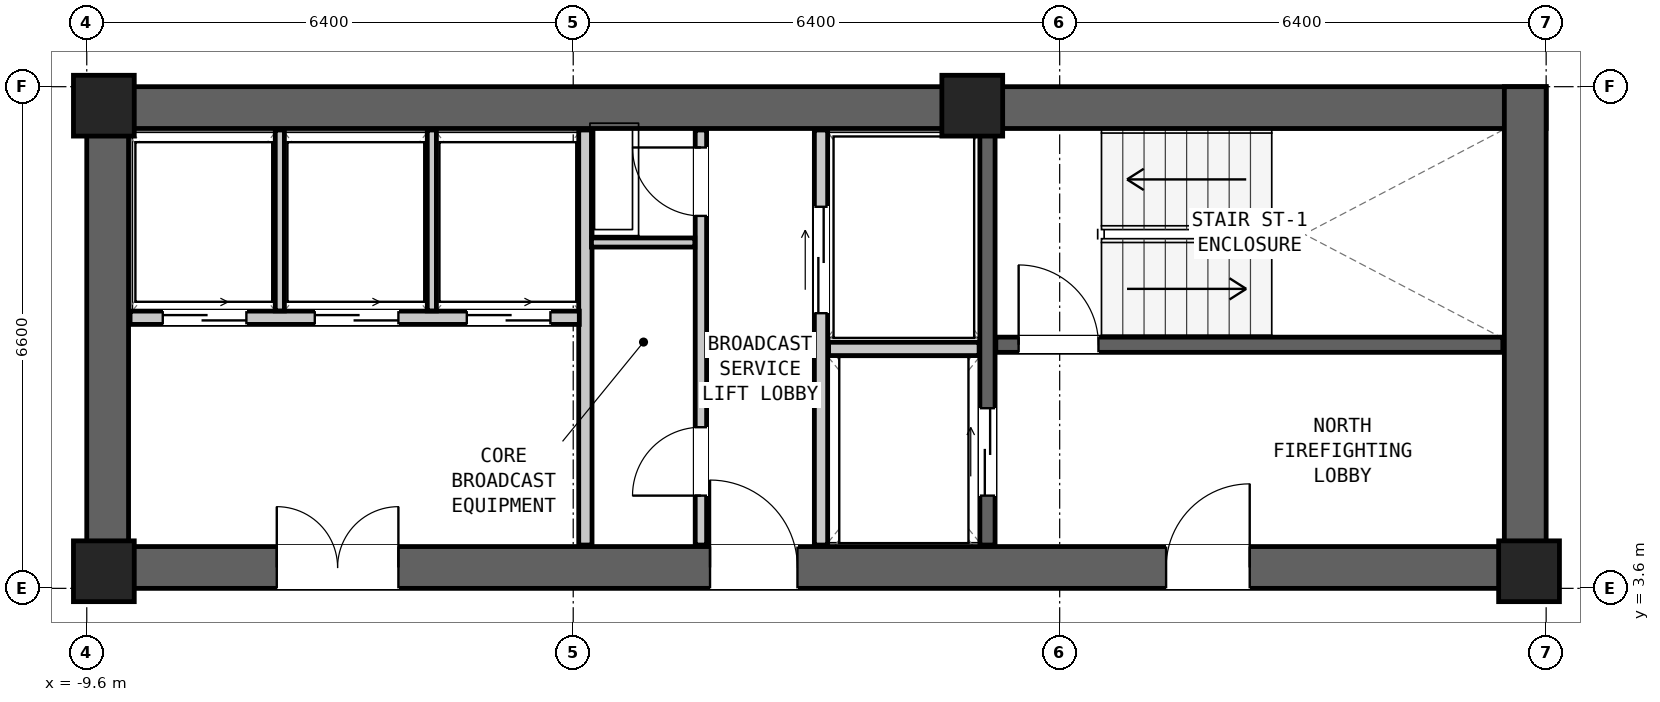
"""IFC4 building model, lengths in metres.
Left out: names, types, materials, properties, quantities, classifications, styles, units other than length and angle.
Written with IfcOpenShell. Run it as: python <this file> out.ifc"""

import sys

from ifc_helpers import new_model, si_unit, direction, frame, frame_2d, origin, origin_2d, place, context, subcontext, project, spatial, rectangle, extrude, element, fill, save


model = new_model("IFC4")
c1 = context("Model", 3, precision=1e-05, world=origin(), true_north=direction((0.0, 1.0)))
c2 = subcontext(c1, "Body", "Model", "MODEL_VIEW")
j1 = project(units=[si_unit("LENGTHUNIT", "METRE"), si_unit("PLANEANGLEUNIT", "RADIAN")], contexts=[c1])
p1 = place(None, origin())
s1 = spatial("IfcSite", under=j1, at=p1, CompositionType="ELEMENT")
p2 = place(p1, origin())
s2 = spatial("IfcBuilding", under=s1, at=p2, CompositionType="ELEMENT")
p3 = place(p2, frame((0.0, 0.0, 44.4)))
s3 = spatial("IfcBuildingStorey", under=s2, at=p3, CompositionType="ELEMENT", Elevation=44.4)
p4 = place(p3, frame((-9.6, 9.925, 0.0), z_axis=(0.0, 0.0, 1.0), x_axis=(1.0, 0.0, 0.0)))
e1 = element("IfcWall", 1, at=p4, inside=s3, PredefinedType="SHEAR", context=c2, shape_type="SweptSolid", body=[
    extrude(rectangle(XDim=19.2, YDim=0.55, at=frame_2d((9.6, 0.0))), origin(), (0.0, 0.0, 1.0), 3.05),
])
p5 = place(p3, frame((-9.6, 3.875, 0.0), z_axis=(0.0, 0.0, 1.0), x_axis=(1.0, 0.0, 0.0)))
e2 = element("IfcWall", 2, at=p5, inside=s3, PredefinedType="SHEAR", context=c2, shape_type="SweptSolid", body=[
    extrude(rectangle(XDim=19.2, YDim=0.55, at=frame_2d((9.6, 0.0))), origin(), (0.0, 0.0, 1.0), 3.05),
])
p6 = place(p5, frame((14.2, 0.0, 0.0)))
e3 = element("IfcOpeningElement", 3, at=p6, cuts=e2, PredefinedType="OPENING", context=c2, shape_type="SweptSolid", body=[
    extrude(rectangle(XDim=1.1, YDim=2.08, at=frame_2d((0.55, 1.04))), frame((0.0, 0.287, 0.0), z_axis=(0.0, -1.0, 0.0), x_axis=(1.0, 0.0, 0.0)), (0.0, 0.0, 1.0), 0.574),
])
p7 = place(p5, frame((8.2, 0.0, 0.0)))
e4 = element("IfcOpeningElement", 4, at=p7, cuts=e2, PredefinedType="OPENING", context=c2, shape_type="SweptSolid", body=[
    extrude(rectangle(XDim=1.15, YDim=2.1, at=frame_2d((0.575, 1.05))), frame((0.0, 0.287, 0.0), z_axis=(0.0, -1.0, 0.0), x_axis=(1.0, 0.0, 0.0)), (0.0, 0.0, 1.0), 0.574),
])
p8 = place(p5, frame((2.5, 0.0, 0.0)))
e5 = element("IfcOpeningElement", 5, at=p8, cuts=e2, PredefinedType="OPENING", context=c2, shape_type="SweptSolid", body=[
    extrude(rectangle(XDim=1.6, YDim=2.12, at=frame_2d((0.8, 1.06))), frame((0.0, 0.287, 0.0), z_axis=(0.0, -1.0, 0.0), x_axis=(1.0, 0.0, 0.0)), (0.0, 0.0, 1.0), 0.574),
])
for number, where, z_axis, x_axis in (
    (6, (-9.325, 3.6, 0.0), (0.0, 0.0, 1.0), (0.0, 1.0, 0.0)),
    (7, (9.325, 3.6, 0.0), (0.0, 0.0, 1.0), (0.0, 1.0, 0.0)),
):
    element("IfcWall", number, at=place(p3, frame(where, z_axis=z_axis, x_axis=x_axis)), inside=s3, PredefinedType="SHEAR", context=c2, shape_type="SweptSolid", body=[
        extrude(rectangle(XDim=6.6, YDim=0.55, at=frame_2d((3.3, 0.0))), origin(), (0.0, 0.0, 1.0), 3.05),
    ])
for number, where, z_axis, x_axis in (
    (8, (-9.375, 9.95, 0.0), (0.0, 0.0, 1.0), (1.0, 0.0, 0.0)),
    (9, (2.05, 9.95, 0.0), (0.0, 0.0, 1.0), (1.0, 0.0, 0.0)),
    (10, (-9.375, 3.825, 0.0), (0.0, 0.0, 1.0), (1.0, 0.0, 0.0)),
    (11, (9.375, 3.825, 0.0), (0.0, 0.0, 1.0), (1.0, 0.0, 0.0)),
):
    element("IfcColumn", number, at=place(p3, frame(where, z_axis=z_axis, x_axis=x_axis)), inside=s3, PredefinedType="COLUMN", context=c2, shape_type="SweptSolid", body=[
        extrude(rectangle(XDim=0.8, YDim=0.8, at=origin_2d()), origin(), (0.0, 0.0, 1.0), 3.05),
    ])
p9 = place(p3, frame((2.36, 6.805, 0.0), z_axis=(0.0, 0.0, 1.0), x_axis=(1.0, 0.0, 0.0)))
e12 = element("IfcWall", 12, at=p9, inside=s3, PredefinedType="SHEAR", context=c2, shape_type="SweptSolid", body=[
    extrude(rectangle(XDim=6.67, YDim=0.2, at=frame_2d((3.335, 0.0))), origin(), (0.0, 0.0, 1.0), 2.83),
])
p10 = place(p9, frame((0.3, 0.0, 0.0)))
e13 = element("IfcOpeningElement", 13, at=p10, cuts=e12, PredefinedType="OPENING", context=c2, shape_type="SweptSolid", body=[
    extrude(rectangle(XDim=1.05, YDim=2.08, at=frame_2d((0.525, 1.04))), frame((0.0, 0.112, 0.0), z_axis=(0.0, -1.0, 0.0), x_axis=(1.0, 0.0, 0.0)), (0.0, 0.0, 1.0), 0.224),
])
p11 = place(p3, frame((2.25, 4.17, 0.0), z_axis=(0.0, 0.0, 1.0), x_axis=(0.0, 1.0, 0.0)))
e14 = element("IfcWall", 14, at=p11, inside=s3, PredefinedType="SHEAR", context=c2, shape_type="SweptSolid", body=[
    extrude(rectangle(XDim=5.46, YDim=0.2, at=frame_2d((2.73, 0.0))), origin(), (0.0, 0.0, 1.0), 2.83),
])
p12 = place(p11, frame((0.65, 0.0, 0.0)))
e15 = element("IfcOpeningElement", 15, at=p12, cuts=e14, PredefinedType="OPENING", context=c2, shape_type="SweptSolid", body=[
    extrude(rectangle(XDim=1.15, YDim=2.08, at=frame_2d((0.575, 1.04))), frame((0.0, 0.112, 0.0), z_axis=(0.0, -1.0, 0.0), x_axis=(1.0, 0.0, 0.0)), (0.0, 0.0, 1.0), 0.224),
])
p13 = place(p3, frame((0.06, 4.17, 0.0), z_axis=(0.0, 0.0, 1.0), x_axis=(0.0, 1.0, 0.0)))
e16 = element("IfcWall", 16, at=p13, inside=s3, PredefinedType="PARTITIONING", context=c2, shape_type="SweptSolid", body=[
    extrude(rectangle(XDim=5.46, YDim=0.175, at=frame_2d((2.73, 0.0))), origin(), (0.0, 0.0, 1.0), 2.83),
])
p14 = place(p13, frame((3.05, 0.0, 0.0)))
e17 = element("IfcOpeningElement", 17, at=p14, cuts=e16, PredefinedType="OPENING", context=c2, shape_type="SweptSolid", body=[
    extrude(rectangle(XDim=1.4, YDim=2.12, at=frame_2d((0.7, 1.06))), frame((0.0, 0.1, 0.0), z_axis=(0.0, -1.0, 0.0), x_axis=(1.0, 0.0, 0.0)), (0.0, 0.0, 1.0), 0.199),
])
p15 = place(p3, frame((0.16, 6.75, 0.0), z_axis=(0.0, 0.0, 1.0), x_axis=(1.0, 0.0, 0.0)))
e18 = element("IfcWall", 18, at=p15, inside=s3, PredefinedType="PARTITIONING", context=c2, shape_type="SweptSolid", body=[
    extrude(rectangle(XDim=1.98, YDim=0.175, at=frame_2d((0.99, 0.0))), origin(), (0.0, 0.0, 1.0), 2.83),
])
p16 = place(p3, frame((-3.04, 4.17, 0.0), z_axis=(0.0, 0.0, 1.0), x_axis=(0.0, 1.0, 0.0)))
e19 = element("IfcWall", 19, at=p16, inside=s3, PredefinedType="PARTITIONING", context=c2, shape_type="SweptSolid", body=[
    extrude(rectangle(XDim=5.46, YDim=0.175, at=frame_2d((2.73, 0.0))), origin(), (0.0, 0.0, 1.0), 2.83),
])
p17 = place(p3, frame((-1.52, 4.17, 0.0), z_axis=(0.0, 0.0, 1.0), x_axis=(0.0, 1.0, 0.0)))
e20 = element("IfcWall", 20, at=p17, inside=s3, PredefinedType="PARTITIONING", context=c2, shape_type="SweptSolid", body=[
    extrude(rectangle(XDim=5.46, YDim=0.15, at=frame_2d((2.73, 0.0))), origin(), (0.0, 0.0, 1.0), 2.83),
])
p18 = place(p17, frame((4.33, 0.0, 0.0)))
e21 = element("IfcOpeningElement", 21, at=p18, cuts=e20, PredefinedType="OPENING", context=c2, shape_type="SweptSolid", body=[
    extrude(rectangle(XDim=0.9, YDim=2.05, at=frame_2d((0.45, 1.025))), frame((0.0, 0.087, 0.0), z_axis=(0.0, -1.0, 0.0), x_axis=(1.0, 0.0, 0.0)), (0.0, 0.0, 1.0), 0.174),
])
p19 = place(p17, frame((0.65, 0.0, 0.0)))
e22 = element("IfcOpeningElement", 22, at=p19, cuts=e20, PredefinedType="OPENING", context=c2, shape_type="SweptSolid", body=[
    extrude(rectangle(XDim=0.9, YDim=2.05, at=frame_2d((0.45, 1.025))), frame((0.0, 0.087, 0.0), z_axis=(0.0, -1.0, 0.0), x_axis=(1.0, 0.0, 0.0)), (0.0, 0.0, 1.0), 0.174),
])
p20 = place(p3, frame((-2.96, 8.15, 0.0), z_axis=(0.0, 0.0, 1.0), x_axis=(1.0, 0.0, 0.0)))
e23 = element("IfcWall", 23, at=p20, inside=s3, PredefinedType="PARTITIONING", context=c2, shape_type="SweptSolid", body=[
    extrude(rectangle(XDim=1.36, YDim=0.12, at=frame_2d((0.68, 0.0))), origin(), (0.0, 0.0, 1.0), 2.83),
])
p21 = place(p3, frame((-9.03, 7.16, 0.0), z_axis=(0.0, 0.0, 1.0), x_axis=(1.0, 0.0, 0.0)))
e24 = element("IfcWall", 24, at=p21, inside=s3, PredefinedType="PARTITIONING", context=c2, shape_type="SweptSolid", body=[
    extrude(rectangle(XDim=5.91, YDim=0.175, at=frame_2d((2.955, 0.0))), origin(), (0.0, 0.0, 1.0), 2.83),
])
p22 = place(p21, frame((0.43, 0.0, 0.0)))
e25 = element("IfcOpeningElement", 25, at=p22, cuts=e24, PredefinedType="OPENING", context=c2, shape_type="SweptSolid", body=[
    extrude(rectangle(XDim=1.1, YDim=2.06, at=frame_2d((0.55, 1.03))), frame((0.0, 0.1, 0.0), z_axis=(0.0, -1.0, 0.0), x_axis=(1.0, 0.0, 0.0)), (0.0, 0.0, 1.0), 0.199),
])
p23 = place(p21, frame((2.43, 0.0, 0.0)))
e26 = element("IfcOpeningElement", 26, at=p23, cuts=e24, PredefinedType="OPENING", context=c2, shape_type="SweptSolid", body=[
    extrude(rectangle(XDim=1.1, YDim=2.06, at=frame_2d((0.55, 1.03))), frame((0.0, 0.1, 0.0), z_axis=(0.0, -1.0, 0.0), x_axis=(1.0, 0.0, 0.0)), (0.0, 0.0, 1.0), 0.199),
])
p24 = place(p21, frame((4.43, 0.0, 0.0)))
e27 = element("IfcOpeningElement", 27, at=p24, cuts=e24, PredefinedType="OPENING", context=c2, shape_type="SweptSolid", body=[
    extrude(rectangle(XDim=1.1, YDim=2.06, at=frame_2d((0.55, 1.03))), frame((0.0, 0.1, 0.0), z_axis=(0.0, -1.0, 0.0), x_axis=(1.0, 0.0, 0.0)), (0.0, 0.0, 1.0), 0.199),
])
for number, where, z_axis, x_axis in (
    (28, (-7.06, 7.25, 0.0), (0.0, 0.0, 1.0), (0.0, 1.0, 0.0)),
    (29, (-5.06, 7.25, 0.0), (0.0, 0.0, 1.0), (0.0, 1.0, 0.0)),
):
    element("IfcWall", number, at=place(p3, frame(where, z_axis=z_axis, x_axis=x_axis)), inside=s3, PredefinedType="PARTITIONING", context=c2, shape_type="SweptSolid", body=[
        extrude(rectangle(XDim=2.38, YDim=0.12, at=frame_2d((1.19, 0.0))), origin(), (0.0, 0.0, 1.0), 2.83),
    ])
p25 = place(p10, origin())
e30 = element("IfcDoor", 30, at=p25, inside=s3, OperationType="SINGLE_SWING_LEFT", PredefinedType="DOOR", context=c2, shape_type="SweptSolid", body=[
    extrude(rectangle(XDim=1.05, YDim=2.08, at=frame_2d((0.525, 1.04))), frame((0.0, 0.025, 0.0), z_axis=(0.0, -1.0, 0.0), x_axis=(1.0, 0.0, 0.0)), (0.0, 0.0, 1.0), 0.05),
])
fill(e13, e30)
p26 = place(p6, origin())
e31 = element("IfcDoor", 31, at=p26, inside=s3, OperationType="SINGLE_SWING_RIGHT", PredefinedType="DOOR", context=c2, shape_type="SweptSolid", body=[
    extrude(rectangle(XDim=1.1, YDim=2.08, at=frame_2d((0.55, 1.04))), frame((0.0, 0.025, 0.0), z_axis=(0.0, -1.0, 0.0), x_axis=(1.0, 0.0, 0.0)), (0.0, 0.0, 1.0), 0.05),
])
fill(e3, e31)
p27 = place(p12, origin())
e32 = element("IfcDoor", 32, at=p27, inside=s3, OperationType="DOUBLE_DOOR_SLIDING", PredefinedType="DOOR", context=c2, shape_type="SweptSolid", body=[
    extrude(rectangle(XDim=1.15, YDim=2.08, at=frame_2d((0.575, 1.04))), frame((0.0, 0.025, 0.0), z_axis=(0.0, -1.0, 0.0), x_axis=(1.0, 0.0, 0.0)), (0.0, 0.0, 1.0), 0.05),
])
fill(e15, e32)
p28 = place(p14, origin())
e33 = element("IfcDoor", 33, at=p28, inside=s3, OperationType="DOUBLE_DOOR_SLIDING", PredefinedType="DOOR", context=c2, shape_type="SweptSolid", body=[
    extrude(rectangle(XDim=1.4, YDim=2.12, at=frame_2d((0.7, 1.06))), frame((0.0, 0.025, 0.0), z_axis=(0.0, -1.0, 0.0), x_axis=(1.0, 0.0, 0.0)), (0.0, 0.0, 1.0), 0.05),
])
fill(e17, e33)
p29 = place(p7, origin())
e34 = element("IfcDoor", 34, at=p29, inside=s3, OperationType="SINGLE_SWING_LEFT", PredefinedType="DOOR", context=c2, shape_type="SweptSolid", body=[
    extrude(rectangle(XDim=1.15, YDim=2.1, at=frame_2d((0.575, 1.05))), frame((0.0, 0.025, 0.0), z_axis=(0.0, -1.0, 0.0), x_axis=(1.0, 0.0, 0.0)), (0.0, 0.0, 1.0), 0.05),
])
fill(e4, e34)
p30 = place(p18, origin())
e35 = element("IfcDoor", 35, at=p30, inside=s3, OperationType="SINGLE_SWING_RIGHT", PredefinedType="DOOR", context=c2, shape_type="SweptSolid", body=[
    extrude(rectangle(XDim=0.9, YDim=2.05, at=frame_2d((0.45, 1.025))), frame((0.0, 0.025, 0.0), z_axis=(0.0, -1.0, 0.0), x_axis=(1.0, 0.0, 0.0)), (0.0, 0.0, 1.0), 0.05),
])
fill(e21, e35)
p31 = place(p19, origin())
e36 = element("IfcDoor", 36, at=p31, inside=s3, OperationType="SINGLE_SWING_LEFT", PredefinedType="DOOR", context=c2, shape_type="SweptSolid", body=[
    extrude(rectangle(XDim=0.9, YDim=2.05, at=frame_2d((0.45, 1.025))), frame((0.0, 0.025, 0.0), z_axis=(0.0, -1.0, 0.0), x_axis=(1.0, 0.0, 0.0)), (0.0, 0.0, 1.0), 0.05),
])
fill(e22, e36)
p32 = place(p22, origin())
e37 = element("IfcDoor", 37, at=p32, inside=s3, OperationType="DOUBLE_DOOR_SLIDING", PredefinedType="DOOR", context=c2, shape_type="SweptSolid", body=[
    extrude(rectangle(XDim=1.1, YDim=2.06, at=frame_2d((0.55, 1.03))), frame((0.0, 0.025, 0.0), z_axis=(0.0, -1.0, 0.0), x_axis=(1.0, 0.0, 0.0)), (0.0, 0.0, 1.0), 0.05),
])
fill(e25, e37)
p33 = place(p23, origin())
e38 = element("IfcDoor", 38, at=p33, inside=s3, OperationType="DOUBLE_DOOR_SLIDING", PredefinedType="DOOR", context=c2, shape_type="SweptSolid", body=[
    extrude(rectangle(XDim=1.1, YDim=2.06, at=frame_2d((0.55, 1.03))), frame((0.0, 0.025, 0.0), z_axis=(0.0, -1.0, 0.0), x_axis=(1.0, 0.0, 0.0)), (0.0, 0.0, 1.0), 0.05),
])
fill(e26, e38)
p34 = place(p24, origin())
e39 = element("IfcDoor", 39, at=p34, inside=s3, OperationType="DOUBLE_DOOR_SLIDING", PredefinedType="DOOR", context=c2, shape_type="SweptSolid", body=[
    extrude(rectangle(XDim=1.1, YDim=2.06, at=frame_2d((0.55, 1.03))), frame((0.0, 0.025, 0.0), z_axis=(0.0, -1.0, 0.0), x_axis=(1.0, 0.0, 0.0)), (0.0, 0.0, 1.0), 0.05),
])
fill(e27, e39)
p35 = place(p8, origin())
e40 = element("IfcDoor", 40, at=p35, inside=s3, OperationType="DOUBLE_DOOR_SINGLE_SWING", PredefinedType="DOOR", context=c2, shape_type="SweptSolid", body=[
    extrude(rectangle(XDim=1.6, YDim=2.12, at=frame_2d((0.8, 1.06))), frame((0.0, 0.025, 0.0), z_axis=(0.0, -1.0, 0.0), x_axis=(1.0, 0.0, 0.0)), (0.0, 0.0, 1.0), 0.05),
])
fill(e5, e40)
save(model, sys.argv[1])
